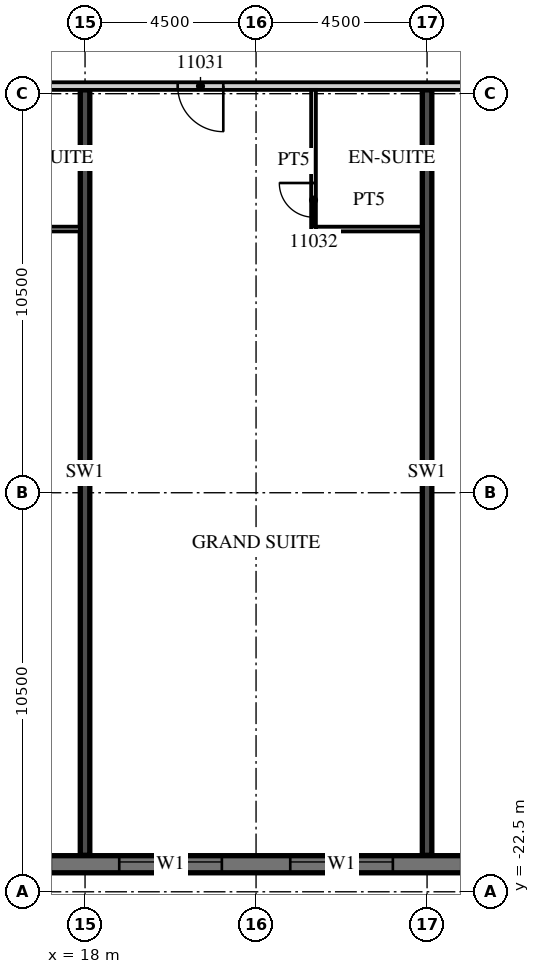
"""IFC4 building model, lengths in metres.
Left out: names, types, materials, properties, quantities, classifications, styles, units other than length and angle.
Written with IfcOpenShell. Run it as: python <this file> out.ifc"""

import sys

from ifc_helpers import new_model, si_unit, direction, frame, frame_2d, origin, place, context, subcontext, project, spatial, rectangle, extrude, element, fill, save


model = new_model("IFC4")
c1 = context("Model", 3, precision=1e-05, world=origin(), true_north=direction((0.0, 1.0)))
c2 = subcontext(c1, "Body", "Model", "MODEL_VIEW")
j1 = project(units=[si_unit("LENGTHUNIT", "METRE"), si_unit("PLANEANGLEUNIT", "RADIAN")], contexts=[c1])
p1 = place(None, origin())
s1 = spatial("IfcSite", under=j1, at=p1, CompositionType="ELEMENT")
p2 = place(p1, origin())
s2 = spatial("IfcBuilding", under=s1, at=p2, CompositionType="ELEMENT")
p3 = place(p2, frame((0.0, 0.0, 66.6)))
s3 = spatial("IfcBuildingStorey", under=s2, at=p3, CompositionType="ELEMENT", Elevation=66.6)
for number, where, z_axis, x_axis in (
    (1, (18.0, -21.54, 0.0), (0.0, 0.0, 1.0), (0.0, 1.0, 0.0)),
    (2, (27.0, -21.54, 0.0), (0.0, 0.0, 1.0), (0.0, 1.0, 0.0)),
):
    element("IfcWall", number, at=place(p3, frame(where, z_axis=z_axis, x_axis=x_axis)), inside=s3, PredefinedType="SHEAR", context=c2, shape_type="SweptSolid", body=[
        extrude(rectangle(XDim=20.14, YDim=0.25, at=frame_2d((10.07, 0.0))), origin(), (0.0, 0.0, 1.0), 3.3),
    ])
p4 = place(p3, frame((-13.5, -21.775, 0.0), z_axis=(0.0, 0.0, 1.0), x_axis=(1.0, 0.0, 0.0)))
e3 = element("IfcWall", 3, at=p4, inside=s3, PredefinedType="SOLIDWALL", context=c2, shape_type="SweptSolid", body=[
    extrude(rectangle(XDim=54.5, YDim=0.45, at=frame_2d((27.25, 0.0))), origin(), (0.0, 0.0, 1.0), 3.02),
])
p5 = place(p4, frame((0.9, 0.0, 0.45)))
e4 = element("IfcOpeningElement", 4, at=p5, cuts=e3, PredefinedType="OPENING", context=c2, shape_type="SweptSolid", body=[
    extrude(rectangle(XDim=2.7, YDim=2.25, at=frame_2d((1.35, 1.125))), frame((0.0, 0.235, 0.0), z_axis=(0.0, -1.0, 0.0), x_axis=(1.0, 0.0, 0.0)), (0.0, 0.0, 1.0), 0.47),
])
p6 = place(p4, frame((5.4, 0.0, 0.45)))
e5 = element("IfcOpeningElement", 5, at=p6, cuts=e3, PredefinedType="OPENING", context=c2, shape_type="SweptSolid", body=[
    extrude(rectangle(XDim=2.7, YDim=2.25, at=frame_2d((1.35, 1.125))), frame((0.0, 0.235, 0.0), z_axis=(0.0, -1.0, 0.0), x_axis=(1.0, 0.0, 0.0)), (0.0, 0.0, 1.0), 0.47),
])
p7 = place(p4, frame((9.9, 0.0, 0.45)))
e6 = element("IfcOpeningElement", 6, at=p7, cuts=e3, PredefinedType="OPENING", context=c2, shape_type="SweptSolid", body=[
    extrude(rectangle(XDim=2.7, YDim=2.25, at=frame_2d((1.35, 1.125))), frame((0.0, 0.235, 0.0), z_axis=(0.0, -1.0, 0.0), x_axis=(1.0, 0.0, 0.0)), (0.0, 0.0, 1.0), 0.47),
])
p8 = place(p4, frame((14.4, 0.0, 0.45)))
e7 = element("IfcOpeningElement", 7, at=p8, cuts=e3, PredefinedType="OPENING", context=c2, shape_type="SweptSolid", body=[
    extrude(rectangle(XDim=2.7, YDim=2.25, at=frame_2d((1.35, 1.125))), frame((0.0, 0.235, 0.0), z_axis=(0.0, -1.0, 0.0), x_axis=(1.0, 0.0, 0.0)), (0.0, 0.0, 1.0), 0.47),
])
p9 = place(p4, frame((18.9, 0.0, 0.45)))
e8 = element("IfcOpeningElement", 8, at=p9, cuts=e3, PredefinedType="OPENING", context=c2, shape_type="SweptSolid", body=[
    extrude(rectangle(XDim=2.7, YDim=2.25, at=frame_2d((1.35, 1.125))), frame((0.0, 0.235, 0.0), z_axis=(0.0, -1.0, 0.0), x_axis=(1.0, 0.0, 0.0)), (0.0, 0.0, 1.0), 0.47),
])
p10 = place(p4, frame((23.4, 0.0, 0.45)))
e9 = element("IfcOpeningElement", 9, at=p10, cuts=e3, PredefinedType="OPENING", context=c2, shape_type="SweptSolid", body=[
    extrude(rectangle(XDim=2.7, YDim=2.25, at=frame_2d((1.35, 1.125))), frame((0.0, 0.235, 0.0), z_axis=(0.0, -1.0, 0.0), x_axis=(1.0, 0.0, 0.0)), (0.0, 0.0, 1.0), 0.47),
])
p11 = place(p4, frame((27.9, 0.0, 0.45)))
e10 = element("IfcOpeningElement", 10, at=p11, cuts=e3, PredefinedType="OPENING", context=c2, shape_type="SweptSolid", body=[
    extrude(rectangle(XDim=2.7, YDim=2.25, at=frame_2d((1.35, 1.125))), frame((0.0, 0.235, 0.0), z_axis=(0.0, -1.0, 0.0), x_axis=(1.0, 0.0, 0.0)), (0.0, 0.0, 1.0), 0.47),
])
p12 = place(p4, frame((32.4, 0.0, 0.45)))
e11 = element("IfcOpeningElement", 11, at=p12, cuts=e3, PredefinedType="OPENING", context=c2, shape_type="SweptSolid", body=[
    extrude(rectangle(XDim=2.7, YDim=2.25, at=frame_2d((1.35, 1.125))), frame((0.0, 0.235, 0.0), z_axis=(0.0, -1.0, 0.0), x_axis=(1.0, 0.0, 0.0)), (0.0, 0.0, 1.0), 0.47),
])
p13 = place(p4, frame((36.9, 0.0, 0.45)))
e12 = element("IfcOpeningElement", 12, at=p13, cuts=e3, PredefinedType="OPENING", context=c2, shape_type="SweptSolid", body=[
    extrude(rectangle(XDim=2.7, YDim=2.25, at=frame_2d((1.35, 1.125))), frame((0.0, 0.235, 0.0), z_axis=(0.0, -1.0, 0.0), x_axis=(1.0, 0.0, 0.0)), (0.0, 0.0, 1.0), 0.47),
])
p14 = place(p4, frame((41.4, 0.0, 0.45)))
e13 = element("IfcOpeningElement", 13, at=p14, cuts=e3, PredefinedType="OPENING", context=c2, shape_type="SweptSolid", body=[
    extrude(rectangle(XDim=2.7, YDim=2.25, at=frame_2d((1.35, 1.125))), frame((0.0, 0.235, 0.0), z_axis=(0.0, -1.0, 0.0), x_axis=(1.0, 0.0, 0.0)), (0.0, 0.0, 1.0), 0.47),
])
p15 = place(p4, frame((45.9, 0.0, 0.45)))
e14 = element("IfcOpeningElement", 14, at=p15, cuts=e3, PredefinedType="OPENING", context=c2, shape_type="SweptSolid", body=[
    extrude(rectangle(XDim=2.7, YDim=2.25, at=frame_2d((1.35, 1.125))), frame((0.0, 0.235, 0.0), z_axis=(0.0, -1.0, 0.0), x_axis=(1.0, 0.0, 0.0)), (0.0, 0.0, 1.0), 0.47),
])
p16 = place(p4, frame((50.4, 0.0, 0.45)))
e15 = element("IfcOpeningElement", 15, at=p16, cuts=e3, PredefinedType="OPENING", context=c2, shape_type="SweptSolid", body=[
    extrude(rectangle(XDim=2.7, YDim=2.25, at=frame_2d((1.35, 1.125))), frame((0.0, 0.235, 0.0), z_axis=(0.0, -1.0, 0.0), x_axis=(1.0, 0.0, 0.0)), (0.0, 0.0, 1.0), 0.47),
])
p17 = place(p3, frame((-13.5, -1.3, 0.0), z_axis=(0.0, 0.0, 1.0), x_axis=(1.0, 0.0, 0.0)))
e16 = element("IfcWall", 16, at=p17, inside=s3, PredefinedType="PARTITIONING", context=c2, shape_type="SweptSolid", body=[
    extrude(rectangle(XDim=58.05, YDim=0.2, at=frame_2d((29.025, 0.0))), origin(), (0.0, 0.0, 1.0), 3.02),
])
p18 = place(p17, frame((2.925, 0.0, 0.0)))
e17 = element("IfcOpeningElement", 17, at=p18, cuts=e16, PredefinedType="OPENING", context=c2, shape_type="SweptSolid", body=[
    extrude(rectangle(XDim=1.0, YDim=2.1, at=frame_2d((0.5, 1.05))), frame((0.0, 0.11, 0.0), z_axis=(0.0, -1.0, 0.0), x_axis=(1.0, 0.0, 0.0)), (0.0, 0.0, 1.0), 0.22),
])
p19 = place(p17, frame((9.863, 0.0, 0.0)))
e18 = element("IfcOpeningElement", 18, at=p19, cuts=e16, PredefinedType="OPENING", context=c2, shape_type="SweptSolid", body=[
    extrude(rectangle(XDim=1.2, YDim=2.1, at=frame_2d((0.6, 1.05))), frame((0.0, 0.11, 0.0), z_axis=(0.0, -1.0, 0.0), x_axis=(1.0, 0.0, 0.0)), (0.0, 0.0, 1.0), 0.22),
])
p20 = place(p17, frame((16.45, 0.0, 0.0)))
e19 = element("IfcOpeningElement", 19, at=p20, cuts=e16, PredefinedType="OPENING", context=c2, shape_type="SweptSolid", body=[
    extrude(rectangle(XDim=1.0, YDim=2.1, at=frame_2d((0.5, 1.05))), frame((0.0, 0.11, 0.0), z_axis=(0.0, -1.0, 0.0), x_axis=(1.0, 0.0, 0.0)), (0.0, 0.0, 1.0), 0.22),
])
p21 = place(p17, frame((18.55, 0.0, 0.0)))
e20 = element("IfcOpeningElement", 20, at=p21, cuts=e16, PredefinedType="OPENING", context=c2, shape_type="SweptSolid", body=[
    extrude(rectangle(XDim=1.0, YDim=2.1, at=frame_2d((0.5, 1.05))), frame((0.0, 0.11, 0.0), z_axis=(0.0, -1.0, 0.0), x_axis=(1.0, 0.0, 0.0)), (0.0, 0.0, 1.0), 0.22),
])
p22 = place(p17, frame((24.938, 0.0, 0.0)))
e21 = element("IfcOpeningElement", 21, at=p22, cuts=e16, PredefinedType="OPENING", context=c2, shape_type="SweptSolid", body=[
    extrude(rectangle(XDim=1.2, YDim=2.1, at=frame_2d((0.6, 1.05))), frame((0.0, 0.11, 0.0), z_axis=(0.0, -1.0, 0.0), x_axis=(1.0, 0.0, 0.0)), (0.0, 0.0, 1.0), 0.22),
])
p23 = place(p17, frame((33.938, 0.0, 0.0)))
e22 = element("IfcOpeningElement", 22, at=p23, cuts=e16, PredefinedType="OPENING", context=c2, shape_type="SweptSolid", body=[
    extrude(rectangle(XDim=1.2, YDim=2.1, at=frame_2d((0.6, 1.05))), frame((0.0, 0.11, 0.0), z_axis=(0.0, -1.0, 0.0), x_axis=(1.0, 0.0, 0.0)), (0.0, 0.0, 1.0), 0.22),
])
p24 = place(p17, frame((42.938, 0.0, 0.0)))
e23 = element("IfcOpeningElement", 23, at=p24, cuts=e16, PredefinedType="OPENING", context=c2, shape_type="SweptSolid", body=[
    extrude(rectangle(XDim=1.2, YDim=2.1, at=frame_2d((0.6, 1.05))), frame((0.0, 0.11, 0.0), z_axis=(0.0, -1.0, 0.0), x_axis=(1.0, 0.0, 0.0)), (0.0, 0.0, 1.0), 0.22),
])
p25 = place(p17, frame((52.425, 0.0, 0.0)))
e24 = element("IfcOpeningElement", 24, at=p25, cuts=e16, PredefinedType="OPENING", context=c2, shape_type="SweptSolid", body=[
    extrude(rectangle(XDim=1.0, YDim=2.1, at=frame_2d((0.5, 1.05))), frame((0.0, 0.11, 0.0), z_axis=(0.0, -1.0, 0.0), x_axis=(1.0, 0.0, 0.0)), (0.0, 0.0, 1.0), 0.22),
])
p26 = place(p17, frame((56.525, 0.0, 0.0)))
e25 = element("IfcOpeningElement", 25, at=p26, cuts=e16, PredefinedType="OPENING", context=c2, shape_type="SweptSolid", body=[
    extrude(rectangle(XDim=1.0, YDim=2.1, at=frame_2d((0.5, 1.05))), frame((0.0, 0.11, 0.0), z_axis=(0.0, -1.0, 0.0), x_axis=(1.0, 0.0, 0.0)), (0.0, 0.0, 1.0), 0.22),
])
p27 = place(p3, frame((15.075, -5.062, 0.0), z_axis=(0.0, 0.0, 1.0), x_axis=(1.0, 0.0, 0.0)))
e26 = element("IfcWall", 26, at=p27, inside=s3, PredefinedType="PARTITIONING", context=c2, shape_type="SweptSolid", body=[
    extrude(rectangle(XDim=2.8, YDim=0.125, at=frame_2d((1.4, 0.0))), origin(), (0.0, 0.0, 1.0), 3.02),
])
p28 = place(p3, frame((24.012, -5.125, 0.0), z_axis=(0.0, 0.0, 1.0), x_axis=(0.0, 1.0, 0.0)))
e27 = element("IfcWall", 27, at=p28, inside=s3, PredefinedType="PARTITIONING", context=c2, shape_type="SweptSolid", body=[
    extrude(rectangle(XDim=3.725, YDim=0.125, at=frame_2d((1.863, 0.0))), origin(), (0.0, 0.0, 1.0), 3.02),
])
p29 = place(p28, frame((0.375, 0.0, 0.0)))
e28 = element("IfcOpeningElement", 28, at=p29, cuts=e27, PredefinedType="OPENING", context=c2, shape_type="SweptSolid", body=[
    extrude(rectangle(XDim=0.9, YDim=2.1, at=frame_2d((0.45, 1.05))), frame((0.0, 0.073, 0.0), z_axis=(0.0, -1.0, 0.0), x_axis=(1.0, 0.0, 0.0)), (0.0, 0.0, 1.0), 0.145),
])
p30 = place(p3, frame((24.075, -5.062, 0.0), z_axis=(0.0, 0.0, 1.0), x_axis=(1.0, 0.0, 0.0)))
e29 = element("IfcWall", 29, at=p30, inside=s3, PredefinedType="PARTITIONING", context=c2, shape_type="SweptSolid", body=[
    extrude(rectangle(XDim=2.8, YDim=0.125, at=frame_2d((1.4, 0.0))), origin(), (0.0, 0.0, 1.0), 3.02),
])
p31 = place(p12, origin())
e30 = element("IfcWindow", 30, at=p31, inside=s3, PartitioningType="SINGLE_PANEL", PredefinedType="WINDOW", context=c2, shape_type="SweptSolid", body=[
    extrude(rectangle(XDim=2.7, YDim=2.25, at=frame_2d((1.35, 1.125))), frame((0.0, 0.09, 0.0), z_axis=(0.0, -1.0, 0.0), x_axis=(1.0, 0.0, 0.0)), (0.0, 0.0, 1.0), 0.06),
])
fill(e11, e30)
p32 = place(p13, origin())
e31 = element("IfcWindow", 31, at=p32, inside=s3, PartitioningType="SINGLE_PANEL", PredefinedType="WINDOW", context=c2, shape_type="SweptSolid", body=[
    extrude(rectangle(XDim=2.7, YDim=2.25, at=frame_2d((1.35, 1.125))), frame((0.0, 0.09, 0.0), z_axis=(0.0, -1.0, 0.0), x_axis=(1.0, 0.0, 0.0)), (0.0, 0.0, 1.0), 0.06),
])
fill(e12, e31)
p33 = place(p23, origin())
e32 = element("IfcDoor", 32, at=p33, inside=s3, OperationType="SINGLE_SWING_RIGHT", PredefinedType="DOOR", context=c2, shape_type="SweptSolid", body=[
    extrude(rectangle(XDim=1.2, YDim=2.1, at=frame_2d((0.6, 1.05))), frame((0.0, 0.025, 0.0), z_axis=(0.0, -1.0, 0.0), x_axis=(1.0, 0.0, 0.0)), (0.0, 0.0, 1.0), 0.05),
])
fill(e22, e32)
p34 = place(p29, origin())
e33 = element("IfcDoor", 33, at=p34, inside=s3, OperationType="SINGLE_SWING_RIGHT", PredefinedType="DOOR", context=c2, shape_type="SweptSolid", body=[
    extrude(rectangle(XDim=0.9, YDim=2.1, at=frame_2d((0.45, 1.05))), frame((0.0, 0.025, 0.0), z_axis=(0.0, -1.0, 0.0), x_axis=(1.0, 0.0, 0.0)), (0.0, 0.0, 1.0), 0.05),
])
fill(e28, e33)
save(model, sys.argv[1])
